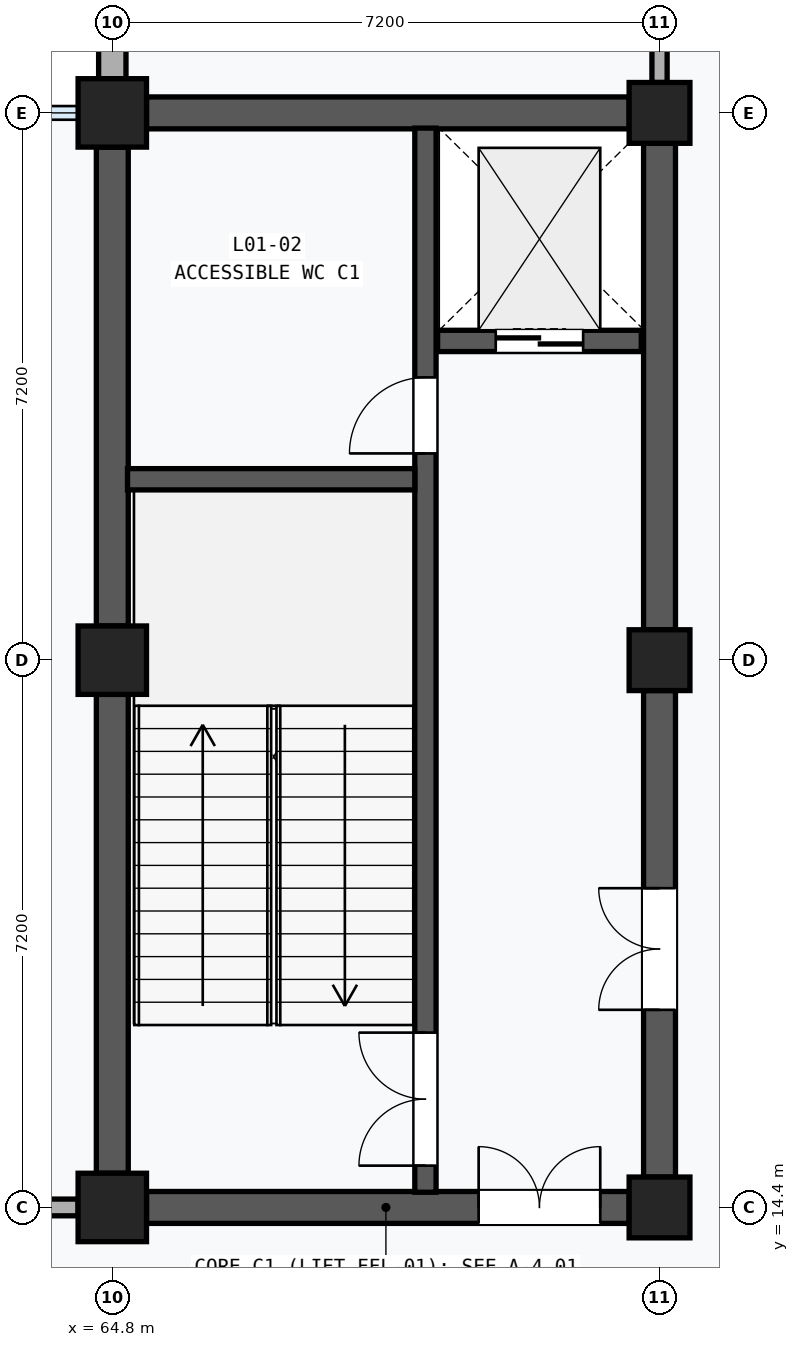
"""IFC4 building model, lengths in metres.
Left out: names, types, materials, properties, quantities, classifications, styles, units other than length and angle.
Written with IfcOpenShell. Run it as: python <this file> out.ifc"""

import sys

from ifc_helpers import new_model, si_unit, direction, frame, frame_2d, origin, origin_2d, place, context, subcontext, project, spatial, rectangle, extrude, element, fill, save


model = new_model("IFC4")
c1 = context("Model", 3, precision=1e-05, world=origin(), true_north=direction((0.0, 1.0)))
c2 = subcontext(c1, "Body", "Model", "MODEL_VIEW")
j1 = project(units=[si_unit("LENGTHUNIT", "METRE"), si_unit("PLANEANGLEUNIT", "RADIAN")], contexts=[c1])
p1 = place(None, origin())
s1 = spatial("IfcSite", under=j1, at=p1, CompositionType="ELEMENT")
p2 = place(p1, origin())
s2 = spatial("IfcBuilding", under=s1, at=p2, CompositionType="ELEMENT")
p3 = place(p2, frame((0.0, 0.0, 4.8)))
s3 = spatial("IfcBuildingStorey", under=s2, at=p3, CompositionType="ELEMENT", Elevation=4.8)
for number, where, z_axis, x_axis in (
    (1, (64.8, 14.4, 0.0), (0.0, 0.0, 1.0), (1.0, 0.0, 0.0)),
    (2, (64.8, 21.6, 0.0), (0.0, 0.0, 1.0), (1.0, 0.0, 0.0)),
    (3, (64.8, 28.8, 0.0), (0.0, 0.0, 1.0), (1.0, 0.0, 0.0)),
):
    element("IfcColumn", number, at=place(p3, frame(where, z_axis=z_axis, x_axis=x_axis)), inside=s3, PredefinedType="COLUMN", context=c2, shape_type="SweptSolid", body=[
        extrude(rectangle(XDim=0.9, YDim=0.9, at=origin_2d()), origin(), (0.0, 0.0, 1.0), 4.8),
    ])
for number, where, z_axis, x_axis in (
    (4, (72.0, 14.4, 0.0), (0.0, 0.0, 1.0), (1.0, 0.0, 0.0)),
    (5, (72.0, 21.6, 0.0), (0.0, 0.0, 1.0), (1.0, 0.0, 0.0)),
    (6, (72.0, 28.8, 0.0), (0.0, 0.0, 1.0), (1.0, 0.0, 0.0)),
):
    element("IfcColumn", number, at=place(p3, frame(where, z_axis=z_axis, x_axis=x_axis)), inside=s3, PredefinedType="COLUMN", context=c2, shape_type="SweptSolid", body=[
        extrude(rectangle(XDim=0.8, YDim=0.8, at=origin_2d()), origin(), (0.0, 0.0, 1.0), 4.8),
    ])
p4 = place(p3, frame((64.8, 29.25, 0.0), z_axis=(0.0, 0.0, 1.0), x_axis=(0.0, 1.0, 0.0)))
e7 = element("IfcWall", 7, at=p4, inside=s3, PredefinedType="SOLIDWALL", context=c2, shape_type="SweptSolid", body=[
    extrude(rectangle(XDim=6.3, YDim=0.36, at=frame_2d((3.15, 0.0))), origin(), (0.0, 0.0, 1.0), 3.85),
])
p5 = place(p4, frame((2.4, 0.0, 1.2)))
e8 = element("IfcOpeningElement", 8, at=p5, cuts=e7, PredefinedType="OPENING", context=c2, shape_type="SweptSolid", body=[
    extrude(rectangle(XDim=1.5, YDim=1.35, at=frame_2d((0.75, 0.675))), frame((0.0, 0.192, 0.0), z_axis=(0.0, -1.0, 0.0), x_axis=(1.0, 0.0, 0.0)), (0.0, 0.0, 1.0), 0.384),
])
p6 = place(p3, frame((64.8, 14.85, 0.0), z_axis=(0.0, 0.0, 1.0), x_axis=(0.0, 1.0, 0.0)))
e9 = element("IfcWall", 9, at=p6, inside=s3, PredefinedType="SHEAR", context=c2, shape_type="SweptSolid", body=[
    extrude(rectangle(XDim=6.3, YDim=0.42, at=frame_2d((3.15, 0.0))), origin(), (0.0, 0.0, 1.0), 3.58),
])
p7 = place(p3, frame((64.8, 22.05, 0.0), z_axis=(0.0, 0.0, 1.0), x_axis=(0.0, 1.0, 0.0)))
e10 = element("IfcWall", 10, at=p7, inside=s3, PredefinedType="SHEAR", context=c2, shape_type="SweptSolid", body=[
    extrude(rectangle(XDim=6.3, YDim=0.42, at=frame_2d((3.15, 0.0))), origin(), (0.0, 0.0, 1.0), 3.58),
])
p8 = place(p3, frame((72.0, 14.8, 0.0), z_axis=(0.0, 0.0, 1.0), x_axis=(0.0, 1.0, 0.0)))
e11 = element("IfcWall", 11, at=p8, inside=s3, PredefinedType="SHEAR", context=c2, shape_type="SweptSolid", body=[
    extrude(rectangle(XDim=6.4, YDim=0.42, at=frame_2d((3.2, 0.0))), origin(), (0.0, 0.0, 1.0), 3.58),
])
p9 = place(p8, frame((2.2, 0.0, 0.0)))
e12 = element("IfcOpeningElement", 12, at=p9, cuts=e11, PredefinedType="OPENING", context=c2, shape_type="SweptSolid", body=[
    extrude(rectangle(XDim=1.6, YDim=2.2, at=frame_2d((0.8, 1.1))), frame((0.0, 0.222, 0.0), z_axis=(0.0, -1.0, 0.0), x_axis=(1.0, 0.0, 0.0)), (0.0, 0.0, 1.0), 0.444),
])
p10 = place(p3, frame((72.0, 22.0, 0.0), z_axis=(0.0, 0.0, 1.0), x_axis=(0.0, 1.0, 0.0)))
e13 = element("IfcWall", 13, at=p10, inside=s3, PredefinedType="SHEAR", context=c2, shape_type="SweptSolid", body=[
    extrude(rectangle(XDim=6.4, YDim=0.42, at=frame_2d((3.2, 0.0))), origin(), (0.0, 0.0, 1.0), 3.58),
])
p11 = place(p3, frame((65.25, 14.4, 0.0), z_axis=(0.0, 0.0, 1.0), x_axis=(1.0, 0.0, 0.0)))
e14 = element("IfcWall", 14, at=p11, inside=s3, PredefinedType="SHEAR", context=c2, shape_type="SweptSolid", body=[
    extrude(rectangle(XDim=6.35, YDim=0.42, at=frame_2d((3.175, 0.0))), origin(), (0.0, 0.0, 1.0), 3.58),
])
p12 = place(p11, frame((4.37, 0.0, 0.0)))
e15 = element("IfcOpeningElement", 15, at=p12, cuts=e14, PredefinedType="OPENING", context=c2, shape_type="SweptSolid", body=[
    extrude(rectangle(XDim=1.6, YDim=2.2, at=frame_2d((0.8, 1.1))), frame((0.0, 0.222, 0.0), z_axis=(0.0, -1.0, 0.0), x_axis=(1.0, 0.0, 0.0)), (0.0, 0.0, 1.0), 0.444),
])
p13 = place(p3, frame((65.25, 28.8, 0.0), z_axis=(0.0, 0.0, 1.0), x_axis=(1.0, 0.0, 0.0)))
e16 = element("IfcWall", 16, at=p13, inside=s3, PredefinedType="SHEAR", context=c2, shape_type="SweptSolid", body=[
    extrude(rectangle(XDim=6.35, YDim=0.42, at=frame_2d((3.175, 0.0))), origin(), (0.0, 0.0, 1.0), 3.58),
])
p14 = place(p3, frame((68.92, 14.6, 0.0), z_axis=(0.0, 0.0, 1.0), x_axis=(0.0, 1.0, 0.0)))
e17 = element("IfcWall", 17, at=p14, inside=s3, PredefinedType="SHEAR", context=c2, shape_type="SweptSolid", body=[
    extrude(rectangle(XDim=14.0, YDim=0.28, at=frame_2d((7.0, 0.0))), origin(), (0.0, 0.0, 1.0), 4.48),
])
p15 = place(p14, frame((0.35, 0.0, 0.0)))
e18 = element("IfcOpeningElement", 18, at=p15, cuts=e17, PredefinedType="OPENING", context=c2, shape_type="SweptSolid", body=[
    extrude(rectangle(XDim=1.75, YDim=2.15, at=frame_2d((0.875, 1.075))), frame((0.0, 0.152, 0.0), z_axis=(0.0, -1.0, 0.0), x_axis=(1.0, 0.0, 0.0)), (0.0, 0.0, 1.0), 0.304),
])
p16 = place(p14, frame((9.72, 0.0, 0.0)))
e19 = element("IfcOpeningElement", 19, at=p16, cuts=e17, PredefinedType="OPENING", context=c2, shape_type="SweptSolid", body=[
    extrude(rectangle(XDim=1.0, YDim=2.15, at=frame_2d((0.5, 1.075))), frame((0.0, 0.152, 0.0), z_axis=(0.0, -1.0, 0.0), x_axis=(1.0, 0.0, 0.0)), (0.0, 0.0, 1.0), 0.304),
])
p17 = place(p3, frame((65.0, 23.98, 0.0), z_axis=(0.0, 0.0, 1.0), x_axis=(1.0, 0.0, 0.0)))
e20 = element("IfcWall", 20, at=p17, inside=s3, PredefinedType="SHEAR", context=c2, shape_type="SweptSolid", body=[
    extrude(rectangle(XDim=3.78, YDim=0.28, at=frame_2d((1.89, 0.0))), origin(), (0.0, 0.0, 1.0), 4.48),
])
p18 = place(p3, frame((69.08, 25.8, 0.0), z_axis=(0.0, 0.0, 1.0), x_axis=(1.0, 0.0, 0.0)))
e21 = element("IfcWall", 21, at=p18, inside=s3, PredefinedType="SHEAR", context=c2, shape_type="SweptSolid", body=[
    extrude(rectangle(XDim=2.68, YDim=0.28, at=frame_2d((1.34, 0.0))), origin(), (0.0, 0.0, 1.0), 4.48),
])
p19 = place(p18, frame((0.765, 0.0, 0.0)))
e22 = element("IfcOpeningElement", 22, at=p19, cuts=e21, PredefinedType="OPENING", context=c2, shape_type="SweptSolid", body=[
    extrude(rectangle(XDim=1.15, YDim=2.2, at=frame_2d((0.575, 1.1))), frame((0.0, 0.152, 0.0), z_axis=(0.0, -1.0, 0.0), x_axis=(1.0, 0.0, 0.0)), (0.0, 0.0, 1.0), 0.304),
])
p20 = place(p3, frame((58.0, 14.4, 0.0), z_axis=(0.0, 0.0, 1.0), x_axis=(1.0, 0.0, 0.0)))
e23 = element("IfcWall", 23, at=p20, inside=s3, PredefinedType="PARTITIONING", context=c2, shape_type="SweptSolid", body=[
    extrude(rectangle(XDim=6.35, YDim=0.22, at=frame_2d((3.175, 0.0))), origin(), (0.0, 0.0, 1.0), 3.58),
])
p21 = place(p20, frame((2.535, 0.0, 0.0)))
e24 = element("IfcOpeningElement", 24, at=p21, cuts=e23, PredefinedType="OPENING", context=c2, shape_type="SweptSolid", body=[
    extrude(rectangle(XDim=1.28, YDim=2.28, at=frame_2d((0.64, 1.14))), frame((0.0, 0.122, 0.0), z_axis=(0.0, -1.0, 0.0), x_axis=(1.0, 0.0, 0.0)), (0.0, 0.0, 1.0), 0.244),
])
p22 = place(p3, frame((72.0, 29.2, 0.0), z_axis=(0.0, 0.0, 1.0), x_axis=(0.0, 1.0, 0.0)))
e25 = element("IfcWall", 25, at=p22, inside=s3, PredefinedType="PARTITIONING", context=c2, shape_type="SweptSolid", body=[
    extrude(rectangle(XDim=6.4, YDim=0.2, at=frame_2d((3.2, 0.0))), origin(), (0.0, 0.0, 1.0), 3.58),
])
p23 = place(p22, frame((2.64, 0.0, 0.0)))
e26 = element("IfcOpeningElement", 26, at=p23, cuts=e25, PredefinedType="OPENING", context=c2, shape_type="SweptSolid", body=[
    extrude(rectangle(XDim=1.12, YDim=2.2, at=frame_2d((0.56, 1.1))), frame((0.0, 0.112, 0.0), z_axis=(0.0, -1.0, 0.0), x_axis=(1.0, 0.0, 0.0)), (0.0, 0.0, 1.0), 0.224),
])
p24 = place(p9, origin())
e27 = element("IfcDoor", 27, at=p24, inside=s3, OperationType="DOUBLE_DOOR_SINGLE_SWING", PredefinedType="DOOR", context=c2, shape_type="SweptSolid", body=[
    extrude(rectangle(XDim=1.6, YDim=2.2, at=frame_2d((0.8, 1.1))), frame((0.0, 0.025, 0.0), z_axis=(0.0, -1.0, 0.0), x_axis=(1.0, 0.0, 0.0)), (0.0, 0.0, 1.0), 0.05),
])
fill(e12, e27)
p25 = place(p12, origin())
e28 = element("IfcDoor", 28, at=p25, inside=s3, OperationType="DOUBLE_DOOR_SINGLE_SWING", PredefinedType="DOOR", context=c2, shape_type="SweptSolid", body=[
    extrude(rectangle(XDim=1.6, YDim=2.2, at=frame_2d((0.8, 1.1))), frame((0.0, 0.025, 0.0), z_axis=(0.0, -1.0, 0.0), x_axis=(1.0, 0.0, 0.0)), (0.0, 0.0, 1.0), 0.05),
])
fill(e15, e28)
p26 = place(p15, origin())
e29 = element("IfcDoor", 29, at=p26, inside=s3, OperationType="DOUBLE_DOOR_SINGLE_SWING", PredefinedType="DOOR", context=c2, shape_type="SweptSolid", body=[
    extrude(rectangle(XDim=1.75, YDim=2.15, at=frame_2d((0.875, 1.075))), frame((0.0, 0.025, 0.0), z_axis=(0.0, -1.0, 0.0), x_axis=(1.0, 0.0, 0.0)), (0.0, 0.0, 1.0), 0.05),
])
fill(e18, e29)
p27 = place(p16, origin())
e30 = element("IfcDoor", 30, at=p27, inside=s3, OperationType="SINGLE_SWING_LEFT", PredefinedType="DOOR", context=c2, shape_type="SweptSolid", body=[
    extrude(rectangle(XDim=1.0, YDim=2.15, at=frame_2d((0.5, 1.075))), frame((0.0, 0.025, 0.0), z_axis=(0.0, -1.0, 0.0), x_axis=(1.0, 0.0, 0.0)), (0.0, 0.0, 1.0), 0.05),
])
fill(e19, e30)
p28 = place(p19, frame((1.15, 0.0, 0.0), z_axis=(0.0, 0.0, 1.0), x_axis=(-1.0, 0.0, 0.0)))
e31 = element("IfcDoor", 31, at=p28, inside=s3, OperationType="DOUBLE_DOOR_SLIDING", PredefinedType="DOOR", context=c2, shape_type="SweptSolid", body=[
    extrude(rectangle(XDim=1.15, YDim=2.2, at=frame_2d((0.575, 1.1))), frame((0.0, 0.025, 0.0), z_axis=(0.0, -1.0, 0.0), x_axis=(1.0, 0.0, 0.0)), (0.0, 0.0, 1.0), 0.05),
])
fill(e22, e31)
save(model, sys.argv[1])
